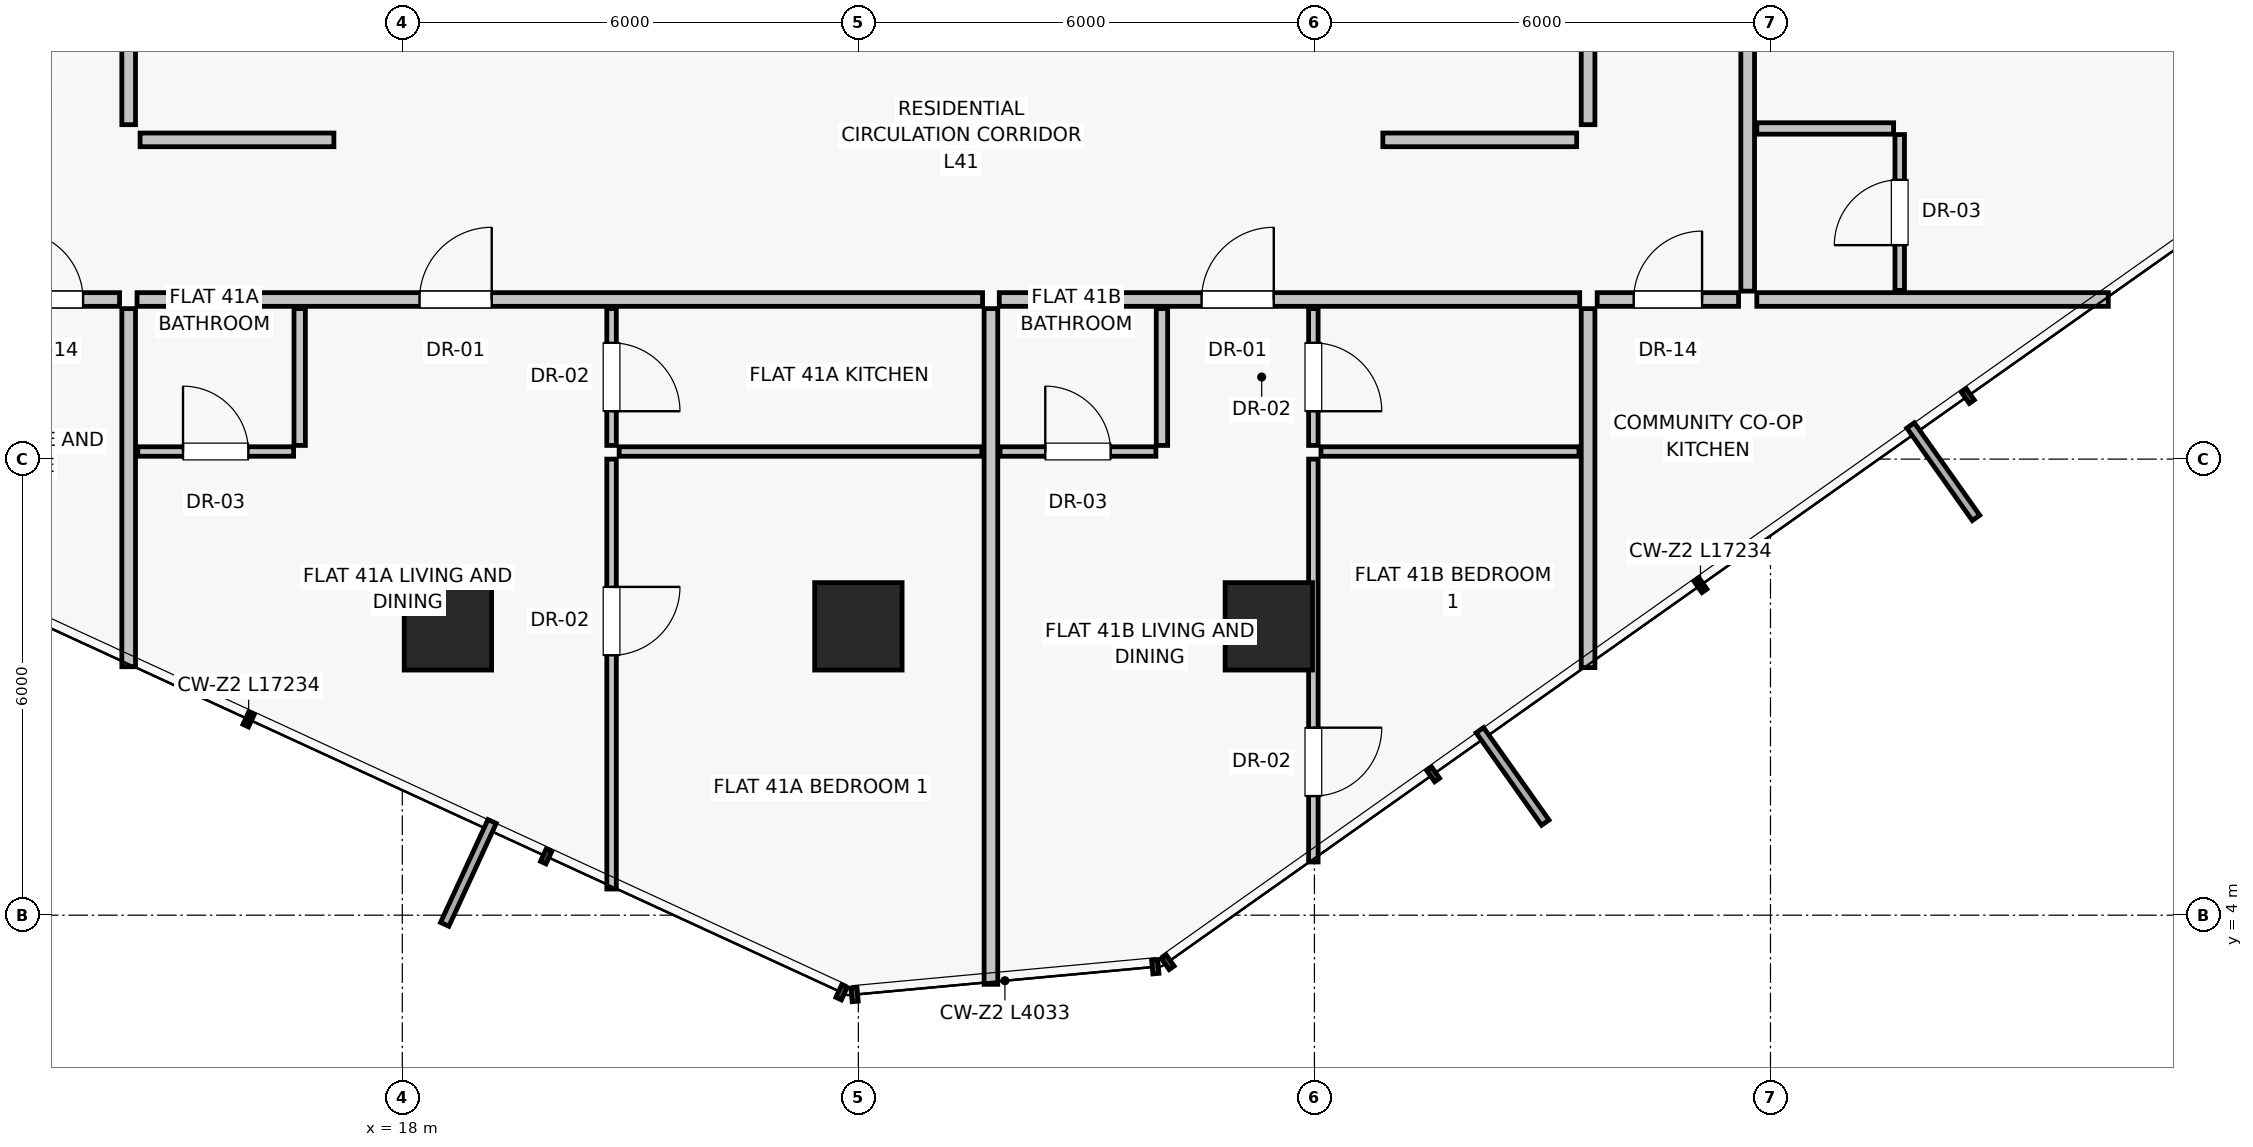
"""IFC4 building model, lengths in metres.
Left out: names, types, materials, properties, quantities, classifications, styles, units other than length and angle.
Written with IfcOpenShell. Run it as: python <this file> out.ifc"""

import sys

from ifc_helpers import new_model, si_unit, direction, frame, frame_2d, origin, origin_2d, place, context, subcontext, project, spatial, rectangle, extrude, source, transform, mapped, element, fill, save


model = new_model("IFC4")
c1 = context("Model", 3, precision=1e-05, world=origin(), true_north=direction((0.0, 1.0)))
c2 = subcontext(c1, "Body", "Model", "MODEL_VIEW")
j1 = project(units=[si_unit("LENGTHUNIT", "METRE"), si_unit("PLANEANGLEUNIT", "RADIAN")], contexts=[c1])
p1 = place(None, origin())
s1 = spatial("IfcSite", under=j1, at=p1, CompositionType="ELEMENT")
p2 = place(p1, origin())
s2 = spatial("IfcBuilding", under=s1, at=p2, CompositionType="ELEMENT")
p3 = place(p2, frame((0.0, 0.0, 145.75)))
s3 = spatial("IfcBuildingStorey", under=s2, at=p3, CompositionType="ELEMENT", Elevation=145.75)
for number, where, z_axis, x_axis in (
    (1, (18.6, 7.8, 0.0), (0.0, 0.0, 1.0), (1.0, 0.0, 0.0)),
    (2, (24.0, 7.8, 0.0), (0.0, 0.0, 1.0), (1.0, 0.0, 0.0)),
    (3, (29.4, 7.8, 0.0), (0.0, 0.0, 1.0), (1.0, 0.0, 0.0)),
):
    element("IfcColumn", number, at=place(p3, frame(where, z_axis=z_axis, x_axis=x_axis)), inside=s3, PredefinedType="COLUMN", context=c2, shape_type="SweptSolid", body=[
        extrude(rectangle(XDim=1.15, YDim=1.15, at=origin_2d()), origin(), (0.0, 0.0, 1.0), 3.25),
    ])
p4 = place(p3, frame((14.4, 14.4, 0.0), z_axis=(0.0, 0.0, 1.0), x_axis=(0.0, 1.0, 0.0)))
e4 = element("IfcWall", 4, at=p4, inside=s3, PredefinedType="PARTITIONING", context=c2, shape_type="SweptSolid", body=[
    extrude(rectangle(XDim=9.4, YDim=0.18, at=frame_2d((4.7, 0.0))), origin(), (0.0, 0.0, 1.0), 3.0),
])
p5 = place(p4, frame((3.8, 0.0, 0.0)))
e5 = element("IfcOpeningElement", 5, at=p5, cuts=e4, PredefinedType="OPENING", context=c2, shape_type="SweptSolid", body=[
    extrude(rectangle(XDim=0.9, YDim=2.01, at=frame_2d((0.45, 1.005))), frame((0.0, 0.1, 0.0), z_axis=(0.0, -1.0, 0.0), x_axis=(1.0, 0.0, 0.0)), (0.0, 0.0, 1.0), 0.2),
])
p6 = place(p3, frame((33.6, 14.4, 0.0), z_axis=(0.0, 0.0, 1.0), x_axis=(0.0, 1.0, 0.0)))
e6 = element("IfcWall", 6, at=p6, inside=s3, PredefinedType="PARTITIONING", context=c2, shape_type="SweptSolid", body=[
    extrude(rectangle(XDim=9.4, YDim=0.18, at=frame_2d((4.7, 0.0))), origin(), (0.0, 0.0, 1.0), 3.0),
])
p7 = place(p6, frame((3.8, 0.0, 0.0)))
e7 = element("IfcOpeningElement", 7, at=p7, cuts=e6, PredefinedType="OPENING", context=c2, shape_type="SweptSolid", body=[
    extrude(rectangle(XDim=0.9, YDim=2.01, at=frame_2d((0.45, 1.005))), frame((0.0, 0.1, 0.0), z_axis=(0.0, -1.0, 0.0), x_axis=(1.0, 0.0, 0.0)), (0.0, 0.0, 1.0), 0.2),
])
for number, where, z_axis, x_axis in (
    (8, (14.55, 14.2, 0.0), (0.0, 0.0, 1.0), (1.0, 0.0, 0.0)),
    (9, (30.9, 14.2, 0.0), (0.0, 0.0, 1.0), (1.0, 0.0, 0.0)),
):
    element("IfcWall", number, at=place(p3, frame(where, z_axis=z_axis, x_axis=x_axis)), inside=s3, PredefinedType="PARTITIONING", context=c2, shape_type="SweptSolid", body=[
        extrude(rectangle(XDim=2.55, YDim=0.18, at=frame_2d((1.275, 0.0))), origin(), (0.0, 0.0, 1.0), 3.0),
    ])
p8 = place(p3, frame((14.4, 11.98, 0.0), z_axis=(0.0, 0.0, 1.0), x_axis=(0.0, -1.0, 0.0)))
e10 = element("IfcWall", 10, at=p8, inside=s3, PredefinedType="PARTITIONING", context=c2, shape_type="SweptSolid", body=[
    extrude(rectangle(XDim=4.711, YDim=0.18, at=frame_2d((2.355, 0.0))), origin(), (0.0, 0.0, 1.0), 3.0),
])
p9 = place(p3, frame((33.6, 11.98, 0.0), z_axis=(0.0, 0.0, 1.0), x_axis=(0.0, -1.0, 0.0)))
e11 = element("IfcWall", 11, at=p9, inside=s3, PredefinedType="PARTITIONING", context=c2, shape_type="SweptSolid", body=[
    extrude(rectangle(XDim=4.723, YDim=0.18, at=frame_2d((2.361, 0.0))), origin(), (0.0, 0.0, 1.0), 3.0),
])
p10 = place(p3, frame((14.51, 12.1, 0.0), z_axis=(0.0, 0.0, 1.0), x_axis=(1.0, 0.0, 0.0)))
e12 = element("IfcWall", 12, at=p10, inside=s3, PredefinedType="PARTITIONING", context=c2, shape_type="SweptSolid", body=[
    extrude(rectangle(XDim=11.124, YDim=0.18, at=frame_2d((5.562, 0.0))), origin(), (0.0, 0.0, 1.0), 2.58),
])
p11 = place(p10, frame((3.717, 0.0, 0.0)))
e13 = element("IfcOpeningElement", 13, at=p11, cuts=e12, PredefinedType="OPENING", context=c2, shape_type="SweptSolid", body=[
    extrude(rectangle(XDim=0.95, YDim=2.02, at=frame_2d((0.475, 1.01))), frame((0.0, 0.1, 0.0), z_axis=(0.0, -1.0, 0.0), x_axis=(1.0, 0.0, 0.0)), (0.0, 0.0, 1.0), 0.2),
])
p12 = place(p3, frame((16.65, 11.98, 0.0), z_axis=(0.0, 0.0, 1.0), x_axis=(0.0, -1.0, 0.0)))
e14 = element("IfcWall", 14, at=p12, inside=s3, PredefinedType="PARTITIONING", context=c2, shape_type="SweptSolid", body=[
    extrude(rectangle(XDim=1.8, YDim=0.15, at=frame_2d((0.9, 0.0))), origin(), (0.0, 0.0, 1.0), 3.0),
])
p13 = place(p3, frame((14.52, 10.1, 0.0), z_axis=(0.0, 0.0, 1.0), x_axis=(1.0, 0.0, 0.0)))
e15 = element("IfcWall", 15, at=p13, inside=s3, PredefinedType="PARTITIONING", context=c2, shape_type="SweptSolid", body=[
    extrude(rectangle(XDim=2.05, YDim=0.125, at=frame_2d((1.025, 0.0))), origin(), (0.0, 0.0, 1.0), 3.0),
])
p14 = place(p13, frame((0.595, 0.0, 0.0)))
e16 = element("IfcOpeningElement", 16, at=p14, cuts=e15, PredefinedType="OPENING", context=c2, shape_type="SweptSolid", body=[
    extrude(rectangle(XDim=0.86, YDim=2.01, at=frame_2d((0.43, 1.005))), frame((0.0, 0.073, 0.0), z_axis=(0.0, -1.0, 0.0), x_axis=(1.0, 0.0, 0.0)), (0.0, 0.0, 1.0), 0.145),
])
p15 = place(p3, frame((20.753, 11.98, 0.0), z_axis=(0.0, 0.0, 1.0), x_axis=(0.0, -1.0, 0.0)))
e17 = element("IfcWall", 17, at=p15, inside=s3, PredefinedType="PARTITIONING", context=c2, shape_type="SweptSolid", body=[
    extrude(rectangle(XDim=1.8, YDim=0.125, at=frame_2d((0.9, 0.0))), origin(), (0.0, 0.0, 1.0), 3.0),
])
p16 = place(p15, frame((0.45, 0.0, 0.0)))
e18 = element("IfcOpeningElement", 18, at=p16, cuts=e17, PredefinedType="OPENING", context=c2, shape_type="SweptSolid", body=[
    extrude(rectangle(XDim=0.9, YDim=2.01, at=frame_2d((0.45, 1.005))), frame((0.0, 0.073, 0.0), z_axis=(0.0, -1.0, 0.0), x_axis=(1.0, 0.0, 0.0)), (0.0, 0.0, 1.0), 0.145),
])
p17 = place(p3, frame((20.853, 10.1, 0.0), z_axis=(0.0, 0.0, 1.0), x_axis=(1.0, 0.0, 0.0)))
e19 = element("IfcWall", 19, at=p17, inside=s3, PredefinedType="PARTITIONING", context=c2, shape_type="SweptSolid", body=[
    extrude(rectangle(XDim=4.771, YDim=0.125, at=frame_2d((2.385, 0.0))), origin(), (0.0, 0.0, 1.0), 3.0),
])
p18 = place(p3, frame((20.753, 10.0, 0.0), z_axis=(0.0, 0.0, 1.0), x_axis=(0.0, -1.0, 0.0)))
e20 = element("IfcWall", 20, at=p18, inside=s3, PredefinedType="PARTITIONING", context=c2, shape_type="SweptSolid", body=[
    extrude(rectangle(XDim=5.656, YDim=0.125, at=frame_2d((2.828, 0.0))), origin(), (0.0, 0.0, 1.0), 3.0),
])
p19 = place(p18, frame((1.681, 0.0, 0.0)))
e21 = element("IfcOpeningElement", 21, at=p19, cuts=e20, PredefinedType="OPENING", context=c2, shape_type="SweptSolid", body=[
    extrude(rectangle(XDim=0.9, YDim=2.01, at=frame_2d((0.45, 1.005))), frame((0.0, 0.073, 0.0), z_axis=(0.0, -1.0, 0.0), x_axis=(1.0, 0.0, 0.0)), (0.0, 0.0, 1.0), 0.145),
])
p20 = place(p3, frame((25.744, 11.98, 0.0), z_axis=(0.0, 0.0, 1.0), x_axis=(0.0, -1.0, 0.0)))
e22 = element("IfcWall", 22, at=p20, inside=s3, PredefinedType="PARTITIONING", context=c2, shape_type="SweptSolid", body=[
    extrude(rectangle(XDim=8.889, YDim=0.18, at=frame_2d((4.445, 0.0))), origin(), (0.0, 0.0, 1.0), 3.0),
])
p21 = place(p3, frame((25.854, 12.1, 0.0), z_axis=(0.0, 0.0, 1.0), x_axis=(1.0, 0.0, 0.0)))
e23 = element("IfcWall", 23, at=p21, inside=s3, PredefinedType="PARTITIONING", context=c2, shape_type="SweptSolid", body=[
    extrude(rectangle(XDim=7.636, YDim=0.18, at=frame_2d((3.818, 0.0))), origin(), (0.0, 0.0, 1.0), 2.58),
])
p22 = place(p21, frame((2.661, 0.0, 0.0)))
e24 = element("IfcOpeningElement", 24, at=p22, cuts=e23, PredefinedType="OPENING", context=c2, shape_type="SweptSolid", body=[
    extrude(rectangle(XDim=0.95, YDim=2.02, at=frame_2d((0.475, 1.01))), frame((0.0, 0.1, 0.0), z_axis=(0.0, -1.0, 0.0), x_axis=(1.0, 0.0, 0.0)), (0.0, 0.0, 1.0), 0.2),
])
p23 = place(p3, frame((27.994, 11.98, 0.0), z_axis=(0.0, 0.0, 1.0), x_axis=(0.0, -1.0, 0.0)))
e25 = element("IfcWall", 25, at=p23, inside=s3, PredefinedType="PARTITIONING", context=c2, shape_type="SweptSolid", body=[
    extrude(rectangle(XDim=1.8, YDim=0.15, at=frame_2d((0.9, 0.0))), origin(), (0.0, 0.0, 1.0), 3.0),
])
p24 = place(p3, frame((25.864, 10.1, 0.0), z_axis=(0.0, 0.0, 1.0), x_axis=(1.0, 0.0, 0.0)))
e26 = element("IfcWall", 26, at=p24, inside=s3, PredefinedType="PARTITIONING", context=c2, shape_type="SweptSolid", body=[
    extrude(rectangle(XDim=2.05, YDim=0.125, at=frame_2d((1.025, 0.0))), origin(), (0.0, 0.0, 1.0), 3.0),
])
p25 = place(p24, frame((0.595, 0.0, 0.0)))
e27 = element("IfcOpeningElement", 27, at=p25, cuts=e26, PredefinedType="OPENING", context=c2, shape_type="SweptSolid", body=[
    extrude(rectangle(XDim=0.86, YDim=2.01, at=frame_2d((0.43, 1.005))), frame((0.0, 0.073, 0.0), z_axis=(0.0, -1.0, 0.0), x_axis=(1.0, 0.0, 0.0)), (0.0, 0.0, 1.0), 0.145),
])
p26 = place(p3, frame((29.986, 11.98, 0.0), z_axis=(0.0, 0.0, 1.0), x_axis=(0.0, -1.0, 0.0)))
e28 = element("IfcWall", 28, at=p26, inside=s3, PredefinedType="PARTITIONING", context=c2, shape_type="SweptSolid", body=[
    extrude(rectangle(XDim=1.8, YDim=0.125, at=frame_2d((0.9, 0.0))), origin(), (0.0, 0.0, 1.0), 2.378),
])
p27 = place(p26, frame((0.45, 0.0, 0.0)))
e29 = element("IfcOpeningElement", 29, at=p27, cuts=e28, PredefinedType="OPENING", context=c2, shape_type="SweptSolid", body=[
    extrude(rectangle(XDim=0.9, YDim=2.01, at=frame_2d((0.45, 1.005))), frame((0.0, 0.073, 0.0), z_axis=(0.0, -1.0, 0.0), x_axis=(1.0, 0.0, 0.0)), (0.0, 0.0, 1.0), 0.145),
])
p28 = place(p3, frame((30.086, 10.1, 0.0), z_axis=(0.0, 0.0, 1.0), x_axis=(1.0, 0.0, 0.0)))
e30 = element("IfcWall", 30, at=p28, inside=s3, PredefinedType="PARTITIONING", context=c2, shape_type="SweptSolid", body=[
    extrude(rectangle(XDim=3.394, YDim=0.125, at=frame_2d((1.697, 0.0))), origin(), (0.0, 0.0, 1.0), 3.0),
])
p29 = place(p3, frame((29.986, 10.0, 0.0), z_axis=(0.0, 0.0, 1.0), x_axis=(0.0, -1.0, 0.0)))
e31 = element("IfcWall", 31, at=p29, inside=s3, PredefinedType="PARTITIONING", context=c2, shape_type="SweptSolid", body=[
    extrude(rectangle(XDim=5.3, YDim=0.125, at=frame_2d((2.65, 0.0))), origin(), (0.0, 0.0, 1.0), 2.378),
])
p30 = place(p29, frame((3.533, 0.0, 0.0)))
e32 = element("IfcOpeningElement", 32, at=p30, cuts=e31, PredefinedType="OPENING", context=c2, shape_type="SweptSolid", body=[
    extrude(rectangle(XDim=0.9, YDim=2.01, at=frame_2d((0.45, 1.005))), frame((0.0, 0.073, 0.0), z_axis=(0.0, -1.0, 0.0), x_axis=(1.0, 0.0, 0.0)), (0.0, 0.0, 1.0), 0.145),
])
p31 = place(p3, frame((35.82, 12.1, 0.0), z_axis=(0.0, 0.0, 1.0), x_axis=(1.0, 0.0, 0.0)))
e33 = element("IfcWall", 33, at=p31, inside=s3, PredefinedType="PARTITIONING", context=c2, shape_type="SweptSolid", body=[
    extrude(rectangle(XDim=4.625, YDim=0.18, at=frame_2d((2.312, 0.0))), origin(), (0.0, 0.0, 1.0), 3.0),
])
p32 = place(p3, frame((35.7, 12.21, 0.0), z_axis=(0.0, 0.0, 1.0), x_axis=(0.0, 1.0, 0.0)))
e34 = element("IfcWall", 34, at=p32, inside=s3, PredefinedType="PARTITIONING", context=c2, shape_type="SweptSolid", body=[
    extrude(rectangle(XDim=13.628, YDim=0.18, at=frame_2d((6.814, 0.0))), origin(), (0.0, 0.0, 1.0), 2.58),
])
p33 = place(p32, frame((4.348, 0.0, 0.0)))
e35 = element("IfcOpeningElement", 35, at=p33, cuts=e34, PredefinedType="OPENING", context=c2, shape_type="SweptSolid", body=[
    extrude(rectangle(XDim=0.95, YDim=2.02, at=frame_2d((0.475, 1.01))), frame((0.0, 0.1, 0.0), z_axis=(0.0, -1.0, 0.0), x_axis=(1.0, 0.0, 0.0)), (0.0, 0.0, 1.0), 0.2),
])
p34 = place(p3, frame((35.82, 14.35, 0.0), z_axis=(0.0, 0.0, 1.0), x_axis=(1.0, 0.0, 0.0)))
e36 = element("IfcWall", 36, at=p34, inside=s3, PredefinedType="PARTITIONING", context=c2, shape_type="SweptSolid", body=[
    extrude(rectangle(XDim=1.8, YDim=0.15, at=frame_2d((0.9, 0.0))), origin(), (0.0, 0.0, 1.0), 3.0),
])
p35 = place(p3, frame((37.7, 12.22, 0.0), z_axis=(0.0, 0.0, 1.0), x_axis=(0.0, 1.0, 0.0)))
e37 = element("IfcWall", 37, at=p35, inside=s3, PredefinedType="PARTITIONING", context=c2, shape_type="SweptSolid", body=[
    extrude(rectangle(XDim=2.05, YDim=0.125, at=frame_2d((1.025, 0.0))), origin(), (0.0, 0.0, 1.0), 3.0),
])
p36 = place(p35, frame((0.595, 0.0, 0.0)))
e38 = element("IfcOpeningElement", 38, at=p36, cuts=e37, PredefinedType="OPENING", context=c2, shape_type="SweptSolid", body=[
    extrude(rectangle(XDim=0.86, YDim=2.01, at=frame_2d((0.43, 1.005))), frame((0.0, 0.073, 0.0), z_axis=(0.0, -1.0, 0.0), x_axis=(1.0, 0.0, 0.0)), (0.0, 0.0, 1.0), 0.145),
])
p37 = place(p3, frame((12.42, 12.1, 0.0), z_axis=(0.0, 0.0, 1.0), x_axis=(1.0, 0.0, 0.0)))
e39 = element("IfcWall", 39, at=p37, inside=s3, PredefinedType="PARTITIONING", context=c2, shape_type="SweptSolid", body=[
    extrude(rectangle(XDim=1.86, YDim=0.18, at=frame_2d((0.93, 0.0))), origin(), (0.0, 0.0, 1.0), 3.0),
])
p38 = place(p37, frame((0.48, 0.0, 0.0)))
e40 = element("IfcOpeningElement", 40, at=p38, cuts=e39, PredefinedType="OPENING", context=c2, shape_type="SweptSolid", body=[
    extrude(rectangle(XDim=0.9, YDim=2.01, at=frame_2d((0.45, 1.005))), frame((0.0, 0.1, 0.0), z_axis=(0.0, -1.0, 0.0), x_axis=(1.0, 0.0, 0.0)), (0.0, 0.0, 1.0), 0.2),
])
p39 = place(p3, frame((33.72, 12.1, 0.0), z_axis=(0.0, 0.0, 1.0), x_axis=(1.0, 0.0, 0.0)))
e41 = element("IfcWall", 41, at=p39, inside=s3, PredefinedType="PARTITIONING", context=c2, shape_type="SweptSolid", body=[
    extrude(rectangle(XDim=1.86, YDim=0.18, at=frame_2d((0.93, 0.0))), origin(), (0.0, 0.0, 1.0), 3.0),
])
p40 = place(p39, frame((0.48, 0.0, 0.0)))
e42 = element("IfcOpeningElement", 42, at=p40, cuts=e41, PredefinedType="OPENING", context=c2, shape_type="SweptSolid", body=[
    extrude(rectangle(XDim=0.9, YDim=2.01, at=frame_2d((0.45, 1.005))), frame((0.0, 0.1, 0.0), z_axis=(0.0, -1.0, 0.0), x_axis=(1.0, 0.0, 0.0)), (0.0, 0.0, 1.0), 0.2),
])
m1 = source(origin(), c2, "Body", "SweptSolid", [
    extrude(rectangle(XDim=0.95, YDim=2.02, at=frame_2d((0.475, 1.01))), frame((0.0, 0.025, 0.0), z_axis=(0.0, -1.0, 0.0), x_axis=(1.0, 0.0, 0.0)), (0.0, 0.0, 1.0), 0.05),
])
p41 = place(p11, origin())
e43 = element("IfcDoor", 43, at=p41, inside=s3, OperationType="SINGLE_SWING_RIGHT", PredefinedType="DOOR", context=c2, shape_type="MappedRepresentation", body=[
    mapped(m1, transform((0.0, 0.0, 0.0), scale=1.0)),
])
fill(e13, e43)
m2 = source(origin(), c2, "Body", "SweptSolid", [
    extrude(rectangle(XDim=0.86, YDim=2.01, at=frame_2d((0.43, 1.005))), frame((0.0, 0.025, 0.0), z_axis=(0.0, -1.0, 0.0), x_axis=(1.0, 0.0, 0.0)), (0.0, 0.0, 1.0), 0.05),
])
p42 = place(p14, origin())
e44 = element("IfcDoor", 44, at=p42, inside=s3, OperationType="SINGLE_SWING_LEFT", PredefinedType="DOOR", context=c2, shape_type="MappedRepresentation", body=[
    mapped(m2, transform((0.0, 0.0, 0.0), scale=1.0)),
])
fill(e16, e44)
m3 = source(origin(), c2, "Body", "SweptSolid", [
    extrude(rectangle(XDim=0.9, YDim=2.01, at=frame_2d((0.45, 1.005))), frame((0.0, 0.025, 0.0), z_axis=(0.0, -1.0, 0.0), x_axis=(1.0, 0.0, 0.0)), (0.0, 0.0, 1.0), 0.05),
])
p43 = place(p16, origin())
e45 = element("IfcDoor", 45, at=p43, inside=s3, OperationType="SINGLE_SWING_RIGHT", PredefinedType="DOOR", context=c2, shape_type="MappedRepresentation", body=[
    mapped(m3, transform((0.0, 0.0, 0.0), scale=1.0)),
])
fill(e18, e45)
p44 = place(p19, origin())
e46 = element("IfcDoor", 46, at=p44, inside=s3, OperationType="SINGLE_SWING_LEFT", PredefinedType="DOOR", context=c2, shape_type="MappedRepresentation", body=[
    mapped(m3, transform((0.0, 0.0, 0.0), scale=1.0)),
])
fill(e21, e46)
p45 = place(p22, origin())
e47 = element("IfcDoor", 47, at=p45, inside=s3, OperationType="SINGLE_SWING_RIGHT", PredefinedType="DOOR", context=c2, shape_type="MappedRepresentation", body=[
    mapped(m1, transform((0.0, 0.0, 0.0), scale=1.0)),
])
fill(e24, e47)
p46 = place(p25, origin())
e48 = element("IfcDoor", 48, at=p46, inside=s3, OperationType="SINGLE_SWING_LEFT", PredefinedType="DOOR", context=c2, shape_type="MappedRepresentation", body=[
    mapped(m2, transform((0.0, 0.0, 0.0), scale=1.0)),
])
fill(e27, e48)
p47 = place(p27, origin())
e49 = element("IfcDoor", 49, at=p47, inside=s3, OperationType="SINGLE_SWING_RIGHT", PredefinedType="DOOR", context=c2, shape_type="MappedRepresentation", body=[
    mapped(m3, transform((0.0, 0.0, 0.0), scale=1.0)),
])
fill(e29, e49)
p48 = place(p30, origin())
e50 = element("IfcDoor", 50, at=p48, inside=s3, OperationType="SINGLE_SWING_LEFT", PredefinedType="DOOR", context=c2, shape_type="MappedRepresentation", body=[
    mapped(m3, transform((0.0, 0.0, 0.0), scale=1.0)),
])
fill(e32, e50)
p49 = place(p36, origin())
e51 = element("IfcDoor", 51, at=p49, inside=s3, OperationType="SINGLE_SWING_LEFT", PredefinedType="DOOR", context=c2, shape_type="MappedRepresentation", body=[
    mapped(m2, transform((0.0, 0.0, 0.0), scale=1.0)),
])
fill(e38, e51)
p50 = place(p38, origin())
e52 = element("IfcDoor", 52, at=p50, inside=s3, OperationType="SINGLE_SWING_LEFT", PredefinedType="DOOR", context=c2, shape_type="MappedRepresentation", body=[
    mapped(m3, transform((0.0, 0.0, 0.0), scale=1.0)),
])
fill(e40, e52)
p51 = place(p40, origin())
e53 = element("IfcDoor", 53, at=p51, inside=s3, OperationType="SINGLE_SWING_RIGHT", PredefinedType="DOOR", context=c2, shape_type="MappedRepresentation", body=[
    mapped(m3, transform((0.0, 0.0, 0.0), scale=1.0)),
])
fill(e42, e53)
save(model, sys.argv[1])
